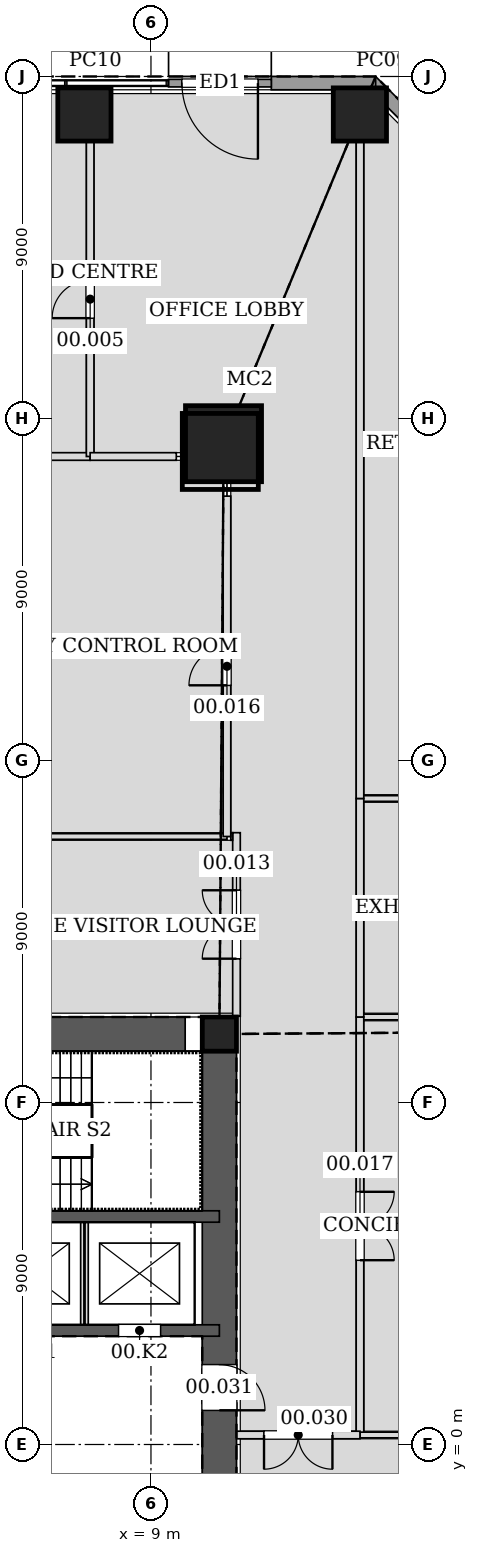
"""IFC4 building model, lengths in metres.
Left out: names, types, materials, properties, quantities, classifications, styles, units other than length and angle.
Written with IfcOpenShell. Run it as: python <this file> out.ifc"""

import sys

from ifc_helpers import new_model, si_unit, direction, frame, frame_2d, origin, origin_2d, place, context, subcontext, project, spatial, rectangle, hollow_rectangle, extrude, element, fill, save


model = new_model("IFC4")
c1 = context("Model", 3, precision=1e-05, world=origin(), true_north=direction((0.0, 1.0)))
c2 = subcontext(c1, "Body", "Model", "MODEL_VIEW")
j1 = project(units=[si_unit("LENGTHUNIT", "METRE"), si_unit("PLANEANGLEUNIT", "RADIAN")], contexts=[c1])
p1 = place(None, origin())
s1 = spatial("IfcSite", under=j1, at=p1, CompositionType="ELEMENT")
p2 = place(p1, origin())
s2 = spatial("IfcBuilding", under=s1, at=p2, CompositionType="ELEMENT")
p3 = place(p2, origin())
s3 = spatial("IfcBuildingStorey", under=s2, at=p3, CompositionType="ELEMENT", Elevation=0.0)
p4 = place(p3, frame((10.909, 26.336, 0.0), z_axis=(-0.011726897842, -0.028266568786, 0.999531630793), x_axis=(0.923665637433, -0.383199413132, 0.0)))
e1 = element("IfcColumn", 1, at=p4, inside=s3, PredefinedType="COLUMN", context=c2, shape_type="SweptSolid", body=[
    extrude(hollow_rectangle(XDim=2.0, YDim=2.0, WallThickness=0.09, at=origin_2d()), origin(), (0.0, 0.0, 1.0), 7.203),
])
for number, where, z_axis, x_axis in (
    (2, (14.498, 35.0, 0.0), (0.0, 0.0, 1.0), (1.0, 0.0, 0.0)),
    (3, (7.249, 35.0, 0.0), (0.0, 0.0, 1.0), (1.0, 0.0, 0.0)),
):
    element("IfcColumn", number, at=place(p3, frame(where, z_axis=z_axis, x_axis=x_axis)), inside=s3, PredefinedType="COLUMN", context=c2, shape_type="SweptSolid", body=[
        extrude(rectangle(XDim=1.4, YDim=1.4, at=origin_2d()), origin(), (0.0, 0.0, 1.0), 7.2),
    ])
p5 = place(p3, frame((10.8, 10.8, 0.0), z_axis=(0.0, 0.0, 1.0), x_axis=(1.0, 0.0, 0.0)))
e4 = element("IfcColumn", 4, at=p5, inside=s3, PredefinedType="COLUMN", context=c2, shape_type="SweptSolid", body=[
    extrude(hollow_rectangle(XDim=0.9, YDim=0.9, WallThickness=0.06, at=origin_2d()), origin(), (0.0, 0.0, 1.0), 7.2),
])
p6 = place(p3, frame((10.8, -10.8, 0.0), z_axis=(0.0, 0.0, 1.0), x_axis=(0.0, 1.0, 0.0)))
e5 = element("IfcWall", 5, at=p6, inside=s3, PredefinedType="SOLIDWALL", context=c2, shape_type="SweptSolid", body=[
    extrude(rectangle(XDim=21.6, YDim=0.9, at=frame_2d((10.8, 0.0))), origin(), (0.0, 0.0, 1.0), 7.2),
])
p7 = place(p6, frame((11.7, 0.0, 0.0)))
e6 = element("IfcOpeningElement", 6, at=p7, cuts=e5, PredefinedType="OPENING", context=c2, shape_type="SweptSolid", body=[
    extrude(rectangle(XDim=1.2, YDim=2.1, at=frame_2d((0.6, 1.05))), frame((0.0, 0.46, 0.0), z_axis=(0.0, -1.0, 0.0), x_axis=(1.0, 0.0, 0.0)), (0.0, 0.0, 1.0), 0.92),
])
p8 = place(p6, frame((8.7, 0.0, 0.0)))
e7 = element("IfcOpeningElement", 7, at=p8, cuts=e5, PredefinedType="OPENING", context=c2, shape_type="SweptSolid", body=[
    extrude(rectangle(XDim=1.2, YDim=2.1, at=frame_2d((0.6, 1.05))), frame((0.0, 0.46, 0.0), z_axis=(0.0, -1.0, 0.0), x_axis=(1.0, 0.0, 0.0)), (0.0, 0.0, 1.0), 0.92),
])
p9 = place(p3, frame((10.8, 10.8, 0.0), z_axis=(0.0, 0.0, 1.0), x_axis=(-1.0, 0.0, 0.0)))
e8 = element("IfcWall", 8, at=p9, inside=s3, PredefinedType="SOLIDWALL", context=c2, shape_type="SweptSolid", body=[
    extrude(rectangle(XDim=21.6, YDim=0.9, at=frame_2d((10.8, 0.0))), origin(), (0.0, 0.0, 1.0), 7.2),
])
p10 = place(p9, frame((10.05, 0.0, 0.0)))
e9 = element("IfcOpeningElement", 9, at=p10, cuts=e8, PredefinedType="OPENING", context=c2, shape_type="SweptSolid", body=[
    extrude(rectangle(XDim=1.5, YDim=2.1, at=frame_2d((0.75, 1.05))), frame((0.0, 0.46, 0.0), z_axis=(0.0, -1.0, 0.0), x_axis=(1.0, 0.0, 0.0)), (0.0, 0.0, 1.0), 0.92),
])
p11 = place(p9, frame((14.1, 0.0, 0.0)))
e10 = element("IfcOpeningElement", 10, at=p11, cuts=e8, PredefinedType="OPENING", context=c2, shape_type="SweptSolid", body=[
    extrude(rectangle(XDim=1.2, YDim=2.1, at=frame_2d((0.6, 1.05))), frame((0.0, 0.46, 0.0), z_axis=(0.0, -1.0, 0.0), x_axis=(1.0, 0.0, 0.0)), (0.0, 0.0, 1.0), 0.92),
])
p12 = place(p9, frame((6.3, 0.0, 0.0)))
e11 = element("IfcOpeningElement", 11, at=p12, cuts=e8, PredefinedType="OPENING", context=c2, shape_type="SweptSolid", body=[
    extrude(rectangle(XDim=1.2, YDim=2.1, at=frame_2d((0.6, 1.05))), frame((0.0, 0.46, 0.0), z_axis=(0.0, -1.0, 0.0), x_axis=(1.0, 0.0, 0.0)), (0.0, 0.0, 1.0), 0.92),
])
p13 = place(p3, frame((-10.8, 3.0, 0.0), z_axis=(0.0, 0.0, 1.0), x_axis=(1.0, 0.0, 0.0)))
e12 = element("IfcWall", 12, at=p13, inside=s3, PredefinedType="SOLIDWALL", context=c2, shape_type="SweptSolid", body=[
    extrude(rectangle(XDim=21.6, YDim=0.3, at=frame_2d((10.8, 0.0))), origin(), (0.0, 0.0, 1.0), 7.2),
])
p14 = place(p13, frame((1.55, 0.0, 0.0)))
e13 = element("IfcOpeningElement", 13, at=p14, cuts=e12, PredefinedType="OPENING", context=c2, shape_type="SweptSolid", body=[
    extrude(rectangle(XDim=1.1, YDim=2.1, at=frame_2d((0.55, 1.05))), frame((0.0, 0.16, 0.0), z_axis=(0.0, -1.0, 0.0), x_axis=(1.0, 0.0, 0.0)), (0.0, 0.0, 1.0), 0.32),
])
p15 = place(p13, frame((4.45, 0.0, 0.0)))
e14 = element("IfcOpeningElement", 14, at=p15, cuts=e12, PredefinedType="OPENING", context=c2, shape_type="SweptSolid", body=[
    extrude(rectangle(XDim=1.1, YDim=2.1, at=frame_2d((0.55, 1.05))), frame((0.0, 0.16, 0.0), z_axis=(0.0, -1.0, 0.0), x_axis=(1.0, 0.0, 0.0)), (0.0, 0.0, 1.0), 0.32),
])
p16 = place(p13, frame((7.35, 0.0, 0.0)))
e15 = element("IfcOpeningElement", 15, at=p16, cuts=e12, PredefinedType="OPENING", context=c2, shape_type="SweptSolid", body=[
    extrude(rectangle(XDim=1.1, YDim=2.1, at=frame_2d((0.55, 1.05))), frame((0.0, 0.16, 0.0), z_axis=(0.0, -1.0, 0.0), x_axis=(1.0, 0.0, 0.0)), (0.0, 0.0, 1.0), 0.32),
])
p17 = place(p13, frame((13.15, 0.0, 0.0)))
e16 = element("IfcOpeningElement", 16, at=p17, cuts=e12, PredefinedType="OPENING", context=c2, shape_type="SweptSolid", body=[
    extrude(rectangle(XDim=1.1, YDim=2.1, at=frame_2d((0.55, 1.05))), frame((0.0, 0.16, 0.0), z_axis=(0.0, -1.0, 0.0), x_axis=(1.0, 0.0, 0.0)), (0.0, 0.0, 1.0), 0.32),
])
p18 = place(p13, frame((16.05, 0.0, 0.0)))
e17 = element("IfcOpeningElement", 17, at=p18, cuts=e12, PredefinedType="OPENING", context=c2, shape_type="SweptSolid", body=[
    extrude(rectangle(XDim=1.1, YDim=2.1, at=frame_2d((0.55, 1.05))), frame((0.0, 0.16, 0.0), z_axis=(0.0, -1.0, 0.0), x_axis=(1.0, 0.0, 0.0)), (0.0, 0.0, 1.0), 0.32),
])
p19 = place(p13, frame((18.95, 0.0, 0.0)))
e18 = element("IfcOpeningElement", 18, at=p19, cuts=e12, PredefinedType="OPENING", context=c2, shape_type="SweptSolid", body=[
    extrude(rectangle(XDim=1.1, YDim=2.1, at=frame_2d((0.55, 1.05))), frame((0.0, 0.16, 0.0), z_axis=(0.0, -1.0, 0.0), x_axis=(1.0, 0.0, 0.0)), (0.0, 0.0, 1.0), 0.32),
])
p20 = place(p3, frame((-10.8, 6.0, 0.0), z_axis=(0.0, 0.0, 1.0), x_axis=(1.0, 0.0, 0.0)))
e19 = element("IfcWall", 19, at=p20, inside=s3, PredefinedType="SOLIDWALL", context=c2, shape_type="SweptSolid", body=[
    extrude(rectangle(XDim=21.6, YDim=0.3, at=frame_2d((10.8, 0.0))), origin(), (0.0, 0.0, 1.0), 7.2),
])
p21 = place(p20, frame((10.25, 0.0, 0.0)))
e20 = element("IfcOpeningElement", 20, at=p21, cuts=e19, PredefinedType="OPENING", context=c2, shape_type="SweptSolid", body=[
    extrude(rectangle(XDim=1.1, YDim=2.1, at=frame_2d((0.55, 1.05))), frame((0.0, 0.16, 0.0), z_axis=(0.0, -1.0, 0.0), x_axis=(1.0, 0.0, 0.0)), (0.0, 0.0, 1.0), 0.32),
])
for number, where, z_axis, x_axis in (
    (21, (16.729, 33.935, 0.0), (0.0, 0.0, 1.0), (-0.707, 0.707, 0.0)),
    (22, (14.912, 35.825, 0.0), (0.0, 0.0, 1.0), (-1.0, 0.0, 0.0)),
):
    element("IfcWall", number, at=place(p3, frame(where, z_axis=z_axis, x_axis=x_axis)), inside=s3, PredefinedType="SOLIDWALL", context=c2, shape_type="SweptSolid", body=[
        extrude(rectangle(XDim=2.745, YDim=0.35, at=frame_2d((1.373, 0.0))), origin(), (0.0, 0.0, 1.0), 6.9),
    ])
p22 = place(p3, frame((12.167, 35.825, 0.0), z_axis=(0.0, 0.0, 1.0), x_axis=(-1.0, 0.0, 0.0)))
e23 = element("IfcWall", 23, at=p22, inside=s3, PredefinedType="SOLIDWALL", context=c2, shape_type="SweptSolid", body=[
    extrude(rectangle(XDim=2.704, YDim=0.2, at=frame_2d((1.352, 0.0))), origin(), (0.0, 0.0, 1.0), 6.9),
])
p23 = place(p22, frame((0.352, 0.0, 0.0)))
e24 = element("IfcOpeningElement", 24, at=p23, cuts=e23, PredefinedType="OPENING", context=c2, shape_type="SweptSolid", body=[
    extrude(rectangle(XDim=2.0, YDim=3.0, at=frame_2d((1.0, 1.5))), frame((0.0, 0.11, 0.0), z_axis=(0.0, -1.0, 0.0), x_axis=(1.0, 0.0, 0.0)), (0.0, 0.0, 1.0), 0.22),
])
p24 = place(p3, frame((4.0, 26.0, 0.0), z_axis=(0.0, 0.0, 1.0), x_axis=(1.0, 0.0, 0.0)))
e25 = element("IfcWall", 25, at=p24, inside=s3, PredefinedType="PARTITIONING", context=c2, shape_type="SweptSolid", body=[
    extrude(rectangle(XDim=3.4, YDim=0.2, at=frame_2d((1.7, 0.0))), origin(), (0.0, 0.0, 1.0), 6.9),
])
p25 = place(p3, frame((7.4, 26.0, 0.0), z_axis=(0.0, 0.0, 1.0), x_axis=(0.0, 1.0, 0.0)))
e26 = element("IfcWall", 26, at=p25, inside=s3, PredefinedType="PARTITIONING", context=c2, shape_type="SweptSolid", body=[
    extrude(rectangle(XDim=8.281, YDim=0.2, at=frame_2d((4.141, 0.0))), origin(), (0.0, 0.0, 1.0), 5.879),
])
p26 = place(p25, frame((3.64, 0.0, 0.0)))
e27 = element("IfcOpeningElement", 27, at=p26, cuts=e26, PredefinedType="OPENING", context=c2, shape_type="SweptSolid", body=[
    extrude(rectangle(XDim=1.0, YDim=2.1, at=frame_2d((0.5, 1.05))), frame((0.0, 0.11, 0.0), z_axis=(0.0, -1.0, 0.0), x_axis=(1.0, 0.0, 0.0)), (0.0, 0.0, 1.0), 0.22),
])
p27 = place(p3, frame((11.001, 16.0, 0.0), z_axis=(0.0, 0.0, 1.0), x_axis=(-1.0, 0.0, 0.0)))
e28 = element("IfcWall", 28, at=p27, inside=s3, PredefinedType="PARTITIONING", context=c2, shape_type="SweptSolid", body=[
    extrude(rectangle(XDim=5.751, YDim=0.15, at=frame_2d((2.875, 0.0))), origin(), (0.0, 0.0, 1.0), 5.59),
])
p28 = place(p3, frame((11.25, 11.269, 0.0), z_axis=(0.0, 0.0, 1.0), x_axis=(0.0, 1.0, 0.0)))
e29 = element("IfcWall", 29, at=p28, inside=s3, PredefinedType="PARTITIONING", context=c2, shape_type="SweptSolid", body=[
    extrude(rectangle(XDim=4.831, YDim=0.2, at=frame_2d((2.416, 0.0))), origin(), (0.0, 0.0, 1.0), 5.79),
])
p29 = place(p28, frame((1.515, 0.0, 0.0)))
e30 = element("IfcOpeningElement", 30, at=p29, cuts=e29, PredefinedType="OPENING", context=c2, shape_type="SweptSolid", body=[
    extrude(rectangle(XDim=1.8, YDim=2.4, at=frame_2d((0.9, 1.2))), frame((0.0, 0.11, 0.0), z_axis=(0.0, -1.0, 0.0), x_axis=(1.0, 0.0, 0.0)), (0.0, 0.0, 1.0), 0.22),
])
p30 = place(p3, frame((11.15, 16.0, 0.0), z_axis=(0.0, 0.0, 1.0), x_axis=(-1.0, 0.0, 0.0)))
e31 = element("IfcWall", 31, at=p30, inside=s3, PredefinedType="PARTITIONING", context=c2, shape_type="SweptSolid", body=[
    extrude(rectangle(XDim=0.05, YDim=0.2, at=frame_2d((0.025, 0.0))), origin(), (0.0, 0.0, 1.0), 5.59),
])
p31 = place(p3, frame((11.0, 16.0, 0.0), z_axis=(0.0, 0.0, 1.0), x_axis=(0.0, 1.0, 0.0)))
e32 = element("IfcWall", 32, at=p31, inside=s3, PredefinedType="PARTITIONING", context=c2, shape_type="SweptSolid", body=[
    extrude(rectangle(XDim=8.957, YDim=0.2, at=frame_2d((4.479, 0.0))), origin(), (0.0, 0.0, 1.0), 5.59),
])
p32 = place(p31, frame((3.978, 0.0, 0.0)))
e33 = element("IfcOpeningElement", 33, at=p32, cuts=e32, PredefinedType="OPENING", context=c2, shape_type="SweptSolid", body=[
    extrude(rectangle(XDim=1.0, YDim=2.1, at=frame_2d((0.5, 1.05))), frame((0.0, 0.11, 0.0), z_axis=(0.0, -1.0, 0.0), x_axis=(1.0, 0.0, 0.0)), (0.0, 0.0, 1.0), 0.22),
])
p33 = place(p3, frame((9.667, 26.0, 0.0), z_axis=(0.0, 0.0, 1.0), x_axis=(-1.0, 0.0, 0.0)))
e34 = element("IfcWall", 34, at=p33, inside=s3, PredefinedType="PARTITIONING", context=c2, shape_type="SweptSolid", body=[
    extrude(rectangle(XDim=2.268, YDim=0.2, at=frame_2d((1.134, 0.0))), origin(), (0.0, 0.0, 1.0), 5.879),
])
p34 = place(p3, frame((21.5, 11.25, 0.0), z_axis=(0.0, 0.0, 1.0), x_axis=(-1.0, 0.0, 0.0)))
e35 = element("IfcWall", 35, at=p34, inside=s3, PredefinedType="PARTITIONING", context=c2, shape_type="SweptSolid", body=[
    extrude(rectangle(XDim=7.0, YDim=0.15, at=frame_2d((3.5, 0.0))), origin(), (0.0, 0.0, 1.0), 6.44),
])
p35 = place(p3, frame((14.5, 11.25, 0.0), z_axis=(0.0, 0.0, 1.0), x_axis=(0.0, -1.0, 0.0)))
e36 = element("IfcWall", 36, at=p35, inside=s3, PredefinedType="PARTITIONING", context=c2, shape_type="SweptSolid", body=[
    extrude(rectangle(XDim=11.0, YDim=0.2, at=frame_2d((5.5, 0.0))), origin(), (0.0, 0.0, 1.0), 5.59),
])
p36 = place(p35, frame((4.6, 0.0, 0.0)))
e37 = element("IfcOpeningElement", 37, at=p36, cuts=e36, PredefinedType="OPENING", context=c2, shape_type="SweptSolid", body=[
    extrude(rectangle(XDim=1.8, YDim=2.4, at=frame_2d((0.9, 1.2))), frame((0.0, 0.11, 0.0), z_axis=(0.0, -1.0, 0.0), x_axis=(1.0, 0.0, 0.0)), (0.0, 0.0, 1.0), 0.22),
])
p37 = place(p3, frame((14.5, 0.25, 0.0), z_axis=(0.0, 0.0, 1.0), x_axis=(1.0, 0.0, 0.0)))
e38 = element("IfcWall", 38, at=p37, inside=s3, PredefinedType="PARTITIONING", context=c2, shape_type="SweptSolid", body=[
    extrude(rectangle(XDim=8.5, YDim=0.15, at=frame_2d((4.25, 0.0))), origin(), (0.0, 0.0, 1.0), 5.59),
])
p38 = place(p3, frame((19.501, 17.0, 0.0), z_axis=(0.0, 0.0, 1.0), x_axis=(-1.0, 0.0, 0.0)))
e39 = element("IfcWall", 39, at=p38, inside=s3, PredefinedType="PARTITIONING", context=c2, shape_type="SweptSolid", body=[
    extrude(rectangle(XDim=5.001, YDim=0.15, at=frame_2d((2.5, 0.0))), origin(), (0.0, 0.0, 1.0), 5.79),
])
p39 = place(p3, frame((14.5, 17.0, 0.0), z_axis=(0.0, 0.0, 1.0), x_axis=(0.0, -1.0, 0.0)))
e40 = element("IfcWall", 40, at=p39, inside=s3, PredefinedType="PARTITIONING", context=c2, shape_type="SweptSolid", body=[
    extrude(rectangle(XDim=5.75, YDim=0.2, at=frame_2d((2.875, 0.0))), origin(), (0.0, 0.0, 1.0), 5.79),
])
p40 = place(p3, frame((14.5, 34.281, 0.0), z_axis=(0.0, 0.0, 1.0), x_axis=(0.0, -1.0, 0.0)))
e41 = element("IfcWall", 41, at=p40, inside=s3, PredefinedType="PARTITIONING", context=c2, shape_type="SweptSolid", body=[
    extrude(rectangle(XDim=17.281, YDim=0.2, at=frame_2d((8.641, 0.0))), origin(), (0.0, 0.0, 1.0), 5.907),
])
p41 = place(p3, frame((11.25, 0.25, 0.0), z_axis=(0.0, 0.0, 1.0), x_axis=(1.0, 0.0, 0.0)))
e42 = element("IfcWall", 42, at=p41, inside=s3, PredefinedType="PARTITIONING", context=c2, shape_type="SweptSolid", body=[
    extrude(rectangle(XDim=3.25, YDim=0.2, at=frame_2d((1.625, 0.0))), origin(), (0.0, 0.0, 1.0), 5.59),
])
p42 = place(p41, frame((0.725, 0.0, 0.0)))
e43 = element("IfcOpeningElement", 43, at=p42, cuts=e42, PredefinedType="OPENING", context=c2, shape_type="SweptSolid", body=[
    extrude(rectangle(XDim=1.8, YDim=2.4, at=frame_2d((0.9, 1.2))), frame((0.0, 0.11, 0.0), z_axis=(0.0, -1.0, 0.0), x_axis=(1.0, 0.0, 0.0)), (0.0, 0.0, 1.0), 0.22),
])
p43 = place(p3, frame((7.25, 3.15, 0.0), z_axis=(0.0, 0.0, 1.0), x_axis=(0.0, 1.0, 0.0)))
e44 = element("IfcWall", 44, at=p43, inside=s3, PredefinedType="PARTITIONING", context=c2, shape_type="SweptSolid", body=[
    extrude(rectangle(XDim=2.7, YDim=0.2, at=frame_2d((1.35, 0.0))), origin(), (0.0, 0.0, 1.0), 7.2),
])
p44 = place(p23, origin())
e45 = element("IfcDoor", 45, at=p44, inside=s3, OperationType="SINGLE_SWING_LEFT", PredefinedType="DOOR", context=c2, shape_type="SweptSolid", body=[
    extrude(rectangle(XDim=2.0, YDim=3.0, at=frame_2d((1.0, 1.5))), frame((0.0, 0.025, 0.0), z_axis=(0.0, -1.0, 0.0), x_axis=(1.0, 0.0, 0.0)), (0.0, 0.0, 1.0), 0.05),
])
fill(e24, e45)
p45 = place(p26, origin())
e46 = element("IfcDoor", 46, at=p45, inside=s3, OperationType="SINGLE_SWING_LEFT", PredefinedType="DOOR", context=c2, shape_type="SweptSolid", body=[
    extrude(rectangle(XDim=1.0, YDim=2.1, at=frame_2d((0.5, 1.05))), frame((0.0, 0.025, 0.0), z_axis=(0.0, -1.0, 0.0), x_axis=(1.0, 0.0, 0.0)), (0.0, 0.0, 1.0), 0.05),
])
fill(e27, e46)
p46 = place(p29, origin())
e47 = element("IfcDoor", 47, at=p46, inside=s3, OperationType="DOUBLE_DOOR_SINGLE_SWING", PredefinedType="DOOR", context=c2, shape_type="SweptSolid", body=[
    extrude(rectangle(XDim=1.8, YDim=2.4, at=frame_2d((0.9, 1.2))), frame((0.0, 0.025, 0.0), z_axis=(0.0, -1.0, 0.0), x_axis=(1.0, 0.0, 0.0)), (0.0, 0.0, 1.0), 0.05),
])
fill(e30, e47)
p47 = place(p32, origin())
e48 = element("IfcDoor", 48, at=p47, inside=s3, OperationType="SINGLE_SWING_LEFT", PredefinedType="DOOR", context=c2, shape_type="SweptSolid", body=[
    extrude(rectangle(XDim=1.0, YDim=2.1, at=frame_2d((0.5, 1.05))), frame((0.0, 0.025, 0.0), z_axis=(0.0, -1.0, 0.0), x_axis=(1.0, 0.0, 0.0)), (0.0, 0.0, 1.0), 0.05),
])
fill(e33, e48)
p48 = place(p36, origin())
e49 = element("IfcDoor", 49, at=p48, inside=s3, OperationType="DOUBLE_DOOR_SINGLE_SWING", PredefinedType="DOOR", context=c2, shape_type="SweptSolid", body=[
    extrude(rectangle(XDim=1.8, YDim=2.4, at=frame_2d((0.9, 1.2))), frame((0.0, 0.025, 0.0), z_axis=(0.0, -1.0, 0.0), x_axis=(1.0, 0.0, 0.0)), (0.0, 0.0, 1.0), 0.05),
])
fill(e37, e49)
p49 = place(p42, frame((1.8, 0.0, 0.0), z_axis=(0.0, 0.0, 1.0), x_axis=(-1.0, 0.0, 0.0)))
e50 = element("IfcDoor", 50, at=p49, inside=s3, OperationType="DOUBLE_DOOR_SINGLE_SWING", PredefinedType="DOOR", context=c2, shape_type="SweptSolid", body=[
    extrude(rectangle(XDim=1.8, YDim=2.4, at=frame_2d((0.9, 1.2))), frame((0.0, 0.025, 0.0), z_axis=(0.0, -1.0, 0.0), x_axis=(1.0, 0.0, 0.0)), (0.0, 0.0, 1.0), 0.05),
])
fill(e43, e50)
p50 = place(p7, frame((1.2, 0.0, 0.0), z_axis=(0.0, 0.0, 1.0), x_axis=(-1.0, 0.0, 0.0)))
e51 = element("IfcDoor", 51, at=p50, inside=s3, OperationType="SINGLE_SWING_RIGHT", PredefinedType="DOOR", context=c2, shape_type="SweptSolid", body=[
    extrude(rectangle(XDim=1.2, YDim=2.1, at=frame_2d((0.6, 1.05))), frame((0.0, 0.025, 0.0), z_axis=(0.0, -1.0, 0.0), x_axis=(1.0, 0.0, 0.0)), (0.0, 0.0, 1.0), 0.05),
])
fill(e6, e51)
p51 = place(p19, origin())
e52 = element("IfcDoor", 52, at=p51, inside=s3, OperationType="DOUBLE_DOOR_SLIDING", PredefinedType="DOOR", context=c2, shape_type="SweptSolid", body=[
    extrude(rectangle(XDim=1.1, YDim=2.1, at=frame_2d((0.55, 1.05))), frame((0.0, 0.025, 0.0), z_axis=(0.0, -1.0, 0.0), x_axis=(1.0, 0.0, 0.0)), (0.0, 0.0, 1.0), 0.05),
])
fill(e18, e52)
save(model, sys.argv[1])
